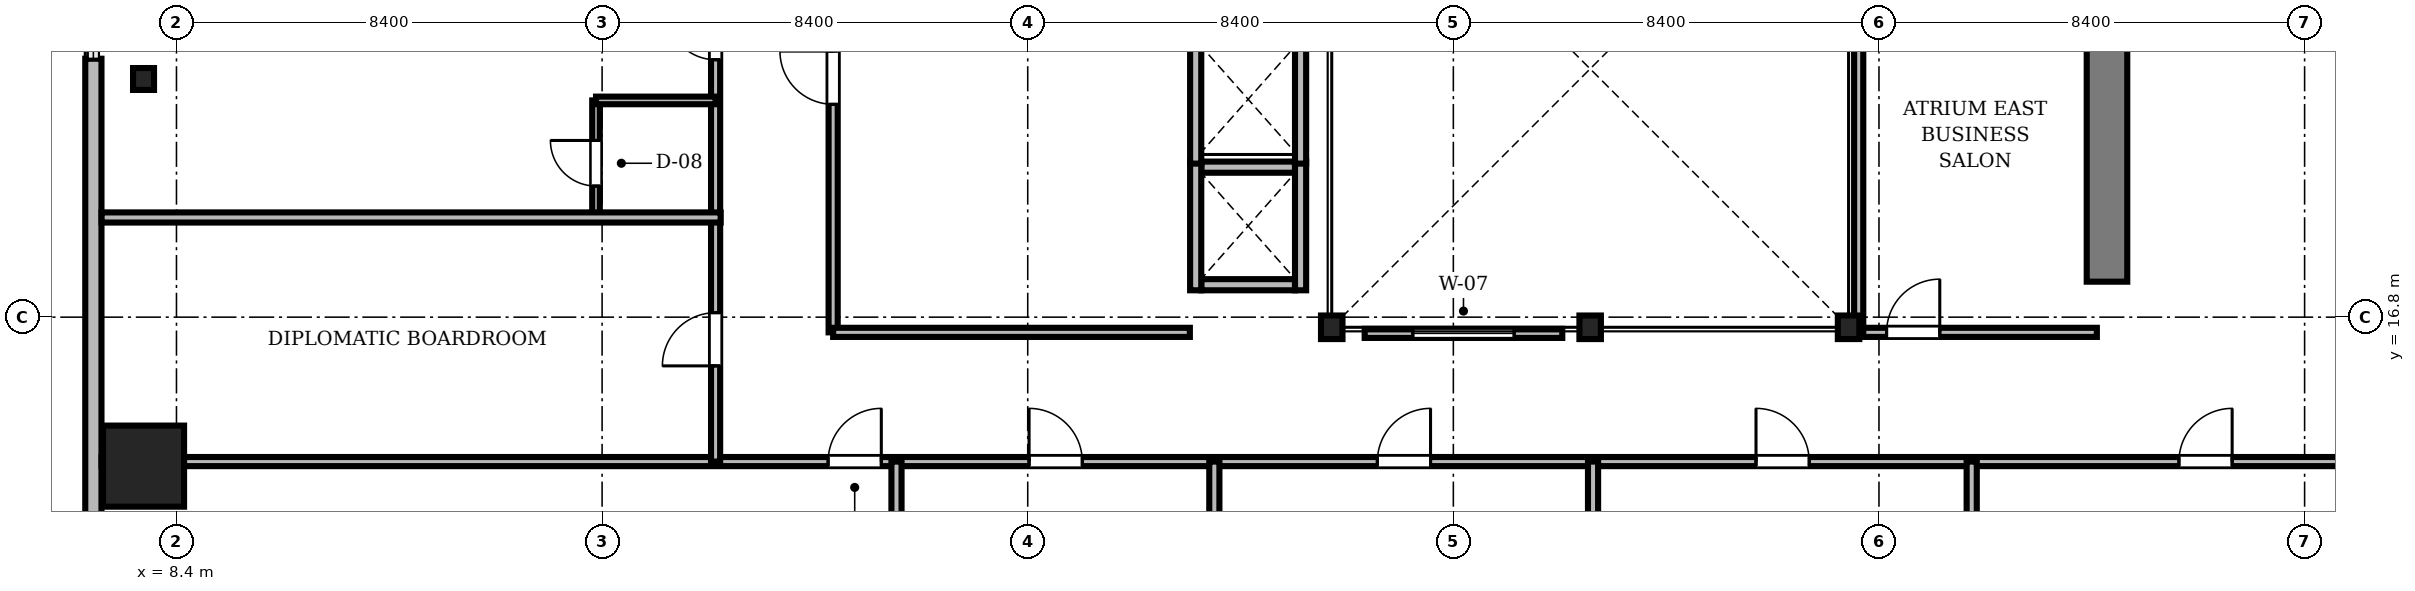
"""IFC4 building model, lengths in metres.
Left out: names, types, materials, properties, quantities, classifications, styles, units other than length and angle.
Written with IfcOpenShell. Run it as: python <this file> out.ifc"""

import sys

from ifc_helpers import new_model, si_unit, direction, frame, frame_2d, origin, origin_2d, place, context, subcontext, project, spatial, rectangle, i_section, extrude, source, transform, mapped, element, fill, save


model = new_model("IFC4")
c1 = context("Model", 3, precision=1e-05, world=origin(), true_north=direction((0.0, 1.0)))
c2 = subcontext(c1, "Body", "Model", "MODEL_VIEW")
j1 = project(units=[si_unit("LENGTHUNIT", "METRE"), si_unit("PLANEANGLEUNIT", "RADIAN")], contexts=[c1])
p1 = place(None, origin())
s1 = spatial("IfcSite", under=j1, at=p1, CompositionType="ELEMENT")
p2 = place(p1, origin())
s2 = spatial("IfcBuilding", under=s1, at=p2, CompositionType="ELEMENT")
p3 = place(p2, frame((0.0, 0.0, 118.7)))
s3 = spatial("IfcBuildingStorey", under=s2, at=p3, CompositionType="ELEMENT", Elevation=118.7)
m1 = source(origin(), c2, "Body", "SweptSolid", [
    extrude(rectangle(XDim=13.15, YDim=0.8, at=frame_2d((6.575, 0.0))), origin(), (0.0, 0.0, 1.0), 3.46),
])
p4 = place(p3, frame((46.5, 17.5, 0.0), z_axis=(0.0, 0.0, 1.0), x_axis=(0.0, 1.0, 0.0)))
e1 = element("IfcWall", 1, at=p4, inside=s3, PredefinedType="SHEAR", context=c2, shape_type="MappedRepresentation", body=[
    mapped(m1, transform((0.0, 0.0, 0.0), scale=1.0)),
])
m2 = source(origin(), c2, "Body", "SweptSolid", [
    extrude(i_section(OverallWidth=0.424, OverallDepth=0.465, WebThickness=0.035, FlangeThickness=0.056, FilletRadius=0.015, at=origin_2d()), origin(), (0.0, 0.0, 1.0), 3.46),
])
for number, where, z_axis, x_axis in (
    (2, (31.2, 16.6, 0.0), (0.0, 0.0, 1.0), (1.0, 0.0, 0.0)),
    (3, (36.3, 16.6, 0.0), (0.0, 0.0, 1.0), (1.0, 0.0, 0.0)),
    (4, (41.4, 16.6, 0.0), (0.0, 0.0, 1.0), (1.0, 0.0, 0.0)),
):
    element("IfcColumn", number, at=place(p3, frame(where, z_axis=z_axis, x_axis=x_axis)), inside=s3, PredefinedType="COLUMN", context=c2, shape_type="MappedRepresentation", body=[
        mapped(m2, transform((0.0, 0.0, 0.0), scale=1.0)),
    ])
m3 = source(origin(), c2, "Body", "SweptSolid", [
    extrude(rectangle(XDim=1.6, YDim=1.6, at=origin_2d()), origin(), (0.0, 0.0, 1.0), 3.46),
])
p5 = place(p3, frame((7.75, 13.86, 0.0), z_axis=(0.0, 0.0, 1.0), x_axis=(1.0, 0.0, 0.0)))
e5 = element("IfcColumn", 5, at=p5, inside=s3, PredefinedType="COLUMN", context=c2, shape_type="MappedRepresentation", body=[
    mapped(m3, transform((0.0, 0.0, 0.0), scale=1.0)),
])
m4 = source(origin(), c2, "Body", "SweptSolid", [
    extrude(i_section(OverallWidth=0.414, OverallDepth=0.432, WebThickness=0.026, FlangeThickness=0.04, FilletRadius=0.015, at=origin_2d()), origin(), (0.0, 0.0, 1.0), 3.46),
])
p6 = place(p3, frame((7.75, 21.5, 0.0), z_axis=(0.0, 0.0, 1.0), x_axis=(1.0, 0.0, 0.0)))
e6 = element("IfcColumn", 6, at=p6, inside=s3, PredefinedType="COLUMN", context=c2, shape_type="MappedRepresentation", body=[
    mapped(m4, transform((0.0, 0.0, 0.0), scale=1.0)),
])
m5 = source(origin(), c2, "Body", "SweptSolid", [
    extrude(rectangle(XDim=15.6, YDim=0.32, at=frame_2d((7.8, 0.0))), origin(), (0.0, 0.0, 1.0), 3.46),
])
p7 = place(p3, frame((6.76, 21.9, 0.0), z_axis=(0.0, 0.0, 1.0), x_axis=(0.0, -1.0, 0.0)))
e7 = element("IfcWall", 7, at=p7, inside=s3, PredefinedType="SOLIDWALL", context=c2, shape_type="MappedRepresentation", body=[
    mapped(m5, transform((0.0, 0.0, 0.0), scale=1.0)),
])
m6 = source(origin(), c2, "Body", "SweptSolid", [
    extrude(rectangle(XDim=2.8, YDim=2.4, at=frame_2d((1.4, 1.2))), frame((0.0, 0.17, 0.0), z_axis=(0.0, -1.0, 0.0), x_axis=(1.0, 0.0, 0.0)), (0.0, 0.0, 1.0), 0.34),
])
p8 = place(p7, frame((10.095, 0.0, 0.72)))
e8 = element("IfcOpeningElement", 8, at=p8, cuts=e7, PredefinedType="OPENING", context=c2, shape_type="MappedRepresentation", body=[
    mapped(m6, transform((0.0, 0.0, 0.0), scale=1.0)),
])
m7 = source(origin(), c2, "Body", "SweptSolid", [
    extrude(rectangle(XDim=1.85, YDim=0.22, at=frame_2d((0.925, 0.0))), origin(), (0.0, 0.0, 1.0), 3.46),
])
for number, where, z_axis, x_axis in (
    (9, (28.625, 17.44, 0.0), (0.0, 0.0, 1.0), (1.0, 0.0, 0.0)),
    (10, (28.625, 19.76, 0.0), (0.0, 0.0, 1.0), (1.0, 0.0, 0.0)),
):
    element("IfcWall", number, at=place(p3, frame(where, z_axis=z_axis, x_axis=x_axis)), inside=s3, PredefinedType="SOLIDWALL", context=c2, shape_type="MappedRepresentation", body=[
        mapped(m7, transform((0.0, 0.0, 0.0), scale=1.0)),
    ])
m8 = source(origin(), c2, "Body", "SweptSolid", [
    extrude(rectangle(XDim=2.54, YDim=0.22, at=frame_2d((1.27, 0.0))), origin(), (0.0, 0.0, 1.0), 3.46),
])
for number, where, z_axis, x_axis in (
    (11, (28.515, 17.33, 0.0), (0.0, 0.0, 1.0), (0.0, 1.0, 0.0)),
    (12, (30.585, 17.33, 0.0), (0.0, 0.0, 1.0), (0.0, 1.0, 0.0)),
    (13, (28.515, 19.83, 0.0), (0.0, 0.0, 1.0), (0.0, 1.0, 0.0)),
    (14, (30.585, 19.83, 0.0), (0.0, 0.0, 1.0), (0.0, 1.0, 0.0)),
):
    element("IfcWall", number, at=place(p3, frame(where, z_axis=z_axis, x_axis=x_axis)), inside=s3, PredefinedType="SOLIDWALL", context=c2, shape_type="MappedRepresentation", body=[
        mapped(m8, transform((0.0, 0.0, 0.0), scale=1.0)),
    ])
m9 = source(origin(), c2, "Body", "SweptSolid", [
    extrude(rectangle(XDim=46.156, YDim=0.18, at=frame_2d((23.078, 0.0))), origin(), (0.0, 0.0, 1.0), 2.702),
])
p9 = place(p3, frame((6.922, 13.95, 0.0), z_axis=(0.0, 0.0, 1.0), x_axis=(1.0, 0.0, 0.0)))
e15 = element("IfcWall", 15, at=p9, inside=s3, PredefinedType="PARTITIONING", context=c2, shape_type="MappedRepresentation", body=[
    mapped(m9, transform((0.0, 0.0, 0.0), scale=1.0)),
])
m10 = source(origin(), c2, "Body", "SweptSolid", [
    extrude(rectangle(XDim=1.05, YDim=2.2, at=frame_2d((0.525, 1.1))), frame((0.0, 0.1, 0.0), z_axis=(0.0, -1.0, 0.0), x_axis=(1.0, 0.0, 0.0)), (0.0, 0.0, 1.0), 0.2),
])
p10 = place(p9, frame((14.338, 0.0, 0.0)))
e16 = element("IfcOpeningElement", 16, at=p10, cuts=e15, PredefinedType="OPENING", context=c2, shape_type="MappedRepresentation", body=[
    mapped(m10, transform((0.0, 0.0, 0.0), scale=1.0)),
])
p11 = place(p9, frame((18.305, 0.0, 0.0)))
e17 = element("IfcOpeningElement", 17, at=p11, cuts=e15, PredefinedType="OPENING", context=c2, shape_type="MappedRepresentation", body=[
    mapped(m10, transform((0.0, 0.0, 0.0), scale=1.0)),
])
p12 = place(p9, frame((25.178, 0.0, 0.0)))
e18 = element("IfcOpeningElement", 18, at=p12, cuts=e15, PredefinedType="OPENING", context=c2, shape_type="MappedRepresentation", body=[
    mapped(m10, transform((0.0, 0.0, 0.0), scale=1.0)),
])
p13 = place(p9, frame((32.651, 0.0, 0.0)))
e19 = element("IfcOpeningElement", 19, at=p13, cuts=e15, PredefinedType="OPENING", context=c2, shape_type="MappedRepresentation", body=[
    mapped(m10, transform((0.0, 0.0, 0.0), scale=1.0)),
])
p14 = place(p9, frame((40.998, 0.0, 0.0)))
e20 = element("IfcOpeningElement", 20, at=p14, cuts=e15, PredefinedType="OPENING", context=c2, shape_type="MappedRepresentation", body=[
    mapped(m10, transform((0.0, 0.0, 0.0), scale=1.0)),
])
m11 = source(origin(), c2, "Body", "SweptSolid", [
    extrude(rectangle(XDim=14.6, YDim=0.18, at=frame_2d((7.3, 0.0))), origin(), (0.0, 0.0, 1.0), 2.852),
])
p15 = place(p3, frame((19.04, 13.95, 0.0), z_axis=(0.0, 0.0, 1.0), x_axis=(0.0, 1.0, 0.0)))
e21 = element("IfcWall", 21, at=p15, inside=s3, PredefinedType="PARTITIONING", context=c2, shape_type="MappedRepresentation", body=[
    mapped(m11, transform((0.0, 0.0, 0.0), scale=1.0)),
])
p16 = place(p15, frame((1.888, 0.0, 0.0)))
e22 = element("IfcOpeningElement", 22, at=p16, cuts=e21, PredefinedType="OPENING", context=c2, shape_type="MappedRepresentation", body=[
    mapped(m10, transform((0.0, 0.0, 0.0), scale=1.0)),
])
m12 = source(origin(), c2, "Body", "SweptSolid", [
    extrude(rectangle(XDim=0.95, YDim=2.15, at=frame_2d((0.475, 1.075))), frame((0.0, 0.1, 0.0), z_axis=(0.0, -1.0, 0.0), x_axis=(1.0, 0.0, 0.0)), (0.0, 0.0, 1.0), 0.2),
])
p17 = place(p15, frame((7.93, 0.0, 0.0)))
e23 = element("IfcOpeningElement", 23, at=p17, cuts=e21, PredefinedType="OPENING", context=c2, shape_type="MappedRepresentation", body=[
    mapped(m12, transform((0.0, 0.0, 0.0), scale=1.0)),
])
p18 = place(p15, frame((11.522, 0.0, 0.0)))
e24 = element("IfcOpeningElement", 24, at=p18, cuts=e21, PredefinedType="OPENING", context=c2, shape_type="MappedRepresentation", body=[
    mapped(m10, transform((0.0, 0.0, 0.0), scale=1.0)),
])
m13 = source(origin(), c2, "Body", "SweptSolid", [
    extrude(rectangle(XDim=11.94, YDim=0.18, at=frame_2d((5.97, 0.0))), origin(), (0.0, 0.0, 1.0), 2.852),
])
p19 = place(p3, frame((21.36, 16.5, 0.0), z_axis=(0.0, 0.0, 1.0), x_axis=(0.0, 1.0, 0.0)))
e25 = element("IfcWall", 25, at=p19, inside=s3, PredefinedType="PARTITIONING", context=c2, shape_type="MappedRepresentation", body=[
    mapped(m13, transform((0.0, 0.0, 0.0), scale=1.0)),
])
p20 = place(p19, frame((4.5, 0.0, 0.0)))
e26 = element("IfcOpeningElement", 26, at=p20, cuts=e25, PredefinedType="OPENING", context=c2, shape_type="MappedRepresentation", body=[
    mapped(m10, transform((0.0, 0.0, 0.0), scale=1.0)),
])
m14 = source(origin(), c2, "Body", "SweptSolid", [
    extrude(rectangle(XDim=4.7, YDim=0.18, at=frame_2d((2.35, 0.0))), origin(), (0.0, 0.0, 1.0), 2.852),
])
p21 = place(p3, frame((41.6, 16.5, 0.0), z_axis=(0.0, 0.0, 1.0), x_axis=(1.0, 0.0, 0.0)))
e27 = element("IfcWall", 27, at=p21, inside=s3, PredefinedType="PARTITIONING", context=c2, shape_type="MappedRepresentation", body=[
    mapped(m14, transform((0.0, 0.0, 0.0), scale=1.0)),
])
p22 = place(p21, frame((0.55, 0.0, 0.0)))
e28 = element("IfcOpeningElement", 28, at=p22, cuts=e27, PredefinedType="OPENING", context=c2, shape_type="MappedRepresentation", body=[
    mapped(m10, transform((0.0, 0.0, 0.0), scale=1.0)),
])
m15 = source(origin(), c2, "Body", "SweptSolid", [
    extrude(rectangle(XDim=2.29, YDim=0.15, at=frame_2d((1.145, 0.0))), origin(), (0.0, 0.0, 1.0), 2.852),
])
p23 = place(p3, frame((16.68, 18.787, 0.0), z_axis=(0.0, 0.0, 1.0), x_axis=(0.0, 1.0, 0.0)))
e29 = element("IfcWall", 29, at=p23, inside=s3, PredefinedType="PARTITIONING", context=c2, shape_type="MappedRepresentation", body=[
    mapped(m15, transform((0.0, 0.0, 0.0), scale=1.0)),
])
m16 = source(origin(), c2, "Body", "SweptSolid", [
    extrude(rectangle(XDim=0.9, YDim=2.1, at=frame_2d((0.45, 1.05))), frame((0.0, 0.085, 0.0), z_axis=(0.0, -1.0, 0.0), x_axis=(1.0, 0.0, 0.0)), (0.0, 0.0, 1.0), 0.17),
])
p24 = place(p23, frame((0.6, 0.0, 0.0)))
e30 = element("IfcOpeningElement", 30, at=p24, cuts=e29, PredefinedType="OPENING", context=c2, shape_type="MappedRepresentation", body=[
    mapped(m16, transform((0.0, 0.0, 0.0), scale=1.0)),
])
m17 = source(origin(), c2, "Body", "SweptSolid", [
    extrude(rectangle(XDim=12.218, YDim=0.2, at=frame_2d((6.109, 0.0))), origin(), (0.0, 0.0, 1.0), 2.702),
])
p25 = place(p3, frame((6.922, 18.767, 0.0), z_axis=(0.0, 0.0, 1.0), x_axis=(1.0, 0.0, 0.0)))
e31 = element("IfcWall", 31, at=p25, inside=s3, PredefinedType="PARTITIONING", context=c2, shape_type="MappedRepresentation", body=[
    mapped(m17, transform((0.0, 0.0, 0.0), scale=1.0)),
])
m18 = source(origin(), c2, "Body", "SweptSolid", [
    extrude(rectangle(XDim=11.828, YDim=0.2, at=frame_2d((5.914, 0.0))), origin(), (0.0, 0.0, 1.0), 2.702),
])
p26 = place(p3, frame((22.61, 2.122, 0.0), z_axis=(0.0, 0.0, 1.0), x_axis=(0.0, 1.0, 0.0)))
e32 = element("IfcWall", 32, at=p26, inside=s3, PredefinedType="PARTITIONING", context=c2, shape_type="MappedRepresentation", body=[
    mapped(m18, transform((0.0, 0.0, 0.0), scale=1.0)),
])
m19 = source(origin(), c2, "Body", "SweptSolid", [
    extrude(rectangle(XDim=12.02, YDim=0.2, at=frame_2d((6.01, 0.0))), origin(), (0.0, 0.0, 1.0), 2.702),
])
p27 = place(p3, frame((28.883, 1.93, 0.0), z_axis=(0.0, 0.0, 1.0), x_axis=(0.0, 1.0, 0.0)))
e33 = element("IfcWall", 33, at=p27, inside=s3, PredefinedType="PARTITIONING", context=c2, shape_type="MappedRepresentation", body=[
    mapped(m19, transform((0.0, 0.0, 0.0), scale=1.0)),
])
for number, where, z_axis, x_axis in (
    (34, (36.357, 2.122, 0.0), (0.0, 0.0, 1.0), (0.0, 1.0, 0.0)),
    (35, (43.83, 2.122, 0.0), (0.0, 0.0, 1.0), (0.0, 1.0, 0.0)),
):
    element("IfcWall", number, at=place(p3, frame(where, z_axis=z_axis, x_axis=x_axis)), inside=s3, PredefinedType="PARTITIONING", context=c2, shape_type="MappedRepresentation", body=[
        mapped(m18, transform((0.0, 0.0, 0.0), scale=1.0)),
    ])
m20 = source(origin(), c2, "Body", "SweptSolid", [
    extrude(rectangle(XDim=7.15, YDim=0.18, at=frame_2d((3.575, 0.0))), origin(), (0.0, 0.0, 1.0), 2.852),
])
p28 = place(p3, frame((41.6, 16.5, 0.0), z_axis=(0.0, 0.0, 1.0), x_axis=(0.0, 1.0, 0.0)))
e36 = element("IfcWall", 36, at=p28, inside=s3, PredefinedType="PARTITIONING", context=c2, shape_type="MappedRepresentation", body=[
    mapped(m20, transform((0.0, 0.0, 0.0), scale=1.0)),
])
m21 = source(origin(), c2, "Body", "SweptSolid", [
    extrude(rectangle(XDim=7.04, YDim=0.18, at=frame_2d((3.52, 0.0))), origin(), (0.0, 0.0, 1.0), 3.46),
])
p29 = place(p3, frame((21.36, 16.5, 0.0), z_axis=(0.0, 0.0, 1.0), x_axis=(1.0, 0.0, 0.0)))
e37 = element("IfcWall", 37, at=p29, inside=s3, PredefinedType="PARTITIONING", context=c2, shape_type="MappedRepresentation", body=[
    mapped(m21, transform((0.0, 0.0, 0.0), scale=1.0)),
])
m22 = source(origin(), c2, "Body", "SweptSolid", [
    extrude(rectangle(XDim=2.36, YDim=0.15, at=frame_2d((1.18, 0.0))), origin(), (0.0, 0.0, 1.0), 3.46),
])
p30 = place(p3, frame((16.68, 21.077, 0.0), z_axis=(0.0, 0.0, 1.0), x_axis=(1.0, 0.0, 0.0)))
e38 = element("IfcWall", 38, at=p30, inside=s3, PredefinedType="PARTITIONING", context=c2, shape_type="MappedRepresentation", body=[
    mapped(m22, transform((0.0, 0.0, 0.0), scale=1.0)),
])
m23 = source(origin(), c2, "Body", "SweptSolid", [
    extrude(rectangle(XDim=3.9, YDim=0.18, at=frame_2d((1.95, 0.0))), origin(), (0.0, 0.0, 1.0), 3.002),
])
p31 = place(p3, frame((31.85, 16.48, 0.0), z_axis=(0.0, 0.0, 1.0), x_axis=(1.0, 0.0, 0.0)))
e39 = element("IfcWall", 39, at=p31, inside=s3, PredefinedType="PARTITIONING", context=c2, shape_type="MappedRepresentation", body=[
    mapped(m23, transform((0.0, 0.0, 0.0), scale=1.0)),
])
m24 = source(origin(), c2, "Body", "SweptSolid", [
    extrude(rectangle(XDim=2.0, YDim=1.9, at=frame_2d((1.0, 0.95))), frame((0.0, 0.1, 0.0), z_axis=(0.0, -1.0, 0.0), x_axis=(1.0, 0.0, 0.0)), (0.0, 0.0, 1.0), 0.2),
])
p32 = place(p31, frame((0.95, 0.0, 0.55)))
e40 = element("IfcOpeningElement", 40, at=p32, cuts=e39, PredefinedType="OPENING", context=c2, shape_type="MappedRepresentation", body=[
    mapped(m24, transform((0.0, 0.0, 0.0), scale=1.0)),
])
m25 = source(origin(), c2, "Body", "SweptSolid", [
    extrude(rectangle(XDim=1.05, YDim=2.2, at=frame_2d((0.525, 1.1))), frame((0.0, 0.025, 0.0), z_axis=(0.0, -1.0, 0.0), x_axis=(1.0, 0.0, 0.0)), (0.0, 0.0, 1.0), 0.05),
])
p33 = place(p10, origin())
e41 = element("IfcDoor", 41, at=p33, inside=s3, OperationType="SINGLE_SWING_RIGHT", PredefinedType="DOOR", context=c2, shape_type="MappedRepresentation", body=[
    mapped(m25, transform((0.0, 0.0, 0.0), scale=1.0)),
])
fill(e16, e41)
p34 = place(p11, origin())
e42 = element("IfcDoor", 42, at=p34, inside=s3, OperationType="SINGLE_SWING_LEFT", PredefinedType="DOOR", context=c2, shape_type="MappedRepresentation", body=[
    mapped(m25, transform((0.0, 0.0, 0.0), scale=1.0)),
])
fill(e17, e42)
p35 = place(p12, origin())
e43 = element("IfcDoor", 43, at=p35, inside=s3, OperationType="SINGLE_SWING_RIGHT", PredefinedType="DOOR", context=c2, shape_type="MappedRepresentation", body=[
    mapped(m25, transform((0.0, 0.0, 0.0), scale=1.0)),
])
fill(e18, e43)
p36 = place(p13, origin())
e44 = element("IfcDoor", 44, at=p36, inside=s3, OperationType="SINGLE_SWING_LEFT", PredefinedType="DOOR", context=c2, shape_type="MappedRepresentation", body=[
    mapped(m25, transform((0.0, 0.0, 0.0), scale=1.0)),
])
fill(e19, e44)
p37 = place(p14, origin())
e45 = element("IfcDoor", 45, at=p37, inside=s3, OperationType="SINGLE_SWING_RIGHT", PredefinedType="DOOR", context=c2, shape_type="MappedRepresentation", body=[
    mapped(m25, transform((0.0, 0.0, 0.0), scale=1.0)),
])
fill(e20, e45)
p38 = place(p16, origin())
e46 = element("IfcDoor", 46, at=p38, inside=s3, OperationType="SINGLE_SWING_LEFT", PredefinedType="DOOR", context=c2, shape_type="MappedRepresentation", body=[
    mapped(m25, transform((0.0, 0.0, 0.0), scale=1.0)),
])
fill(e22, e46)
m26 = source(origin(), c2, "Body", "SweptSolid", [
    extrude(rectangle(XDim=0.95, YDim=2.15, at=frame_2d((0.475, 1.075))), frame((0.0, 0.025, 0.0), z_axis=(0.0, -1.0, 0.0), x_axis=(1.0, 0.0, 0.0)), (0.0, 0.0, 1.0), 0.05),
])
p39 = place(p17, origin())
e47 = element("IfcDoor", 47, at=p39, inside=s3, OperationType="SINGLE_SWING_RIGHT", PredefinedType="DOOR", context=c2, shape_type="MappedRepresentation", body=[
    mapped(m26, transform((0.0, 0.0, 0.0), scale=1.0)),
])
fill(e23, e47)
p40 = place(p20, origin())
e48 = element("IfcDoor", 48, at=p40, inside=s3, OperationType="SINGLE_SWING_RIGHT", PredefinedType="DOOR", context=c2, shape_type="MappedRepresentation", body=[
    mapped(m25, transform((0.0, 0.0, 0.0), scale=1.0)),
])
fill(e26, e48)
p41 = place(p22, origin())
e49 = element("IfcDoor", 49, at=p41, inside=s3, OperationType="SINGLE_SWING_RIGHT", PredefinedType="DOOR", context=c2, shape_type="MappedRepresentation", body=[
    mapped(m25, transform((0.0, 0.0, 0.0), scale=1.0)),
])
fill(e28, e49)
m27 = source(origin(), c2, "Body", "SweptSolid", [
    extrude(rectangle(XDim=0.9, YDim=2.1, at=frame_2d((0.45, 1.05))), frame((0.0, 0.025, 0.0), z_axis=(0.0, -1.0, 0.0), x_axis=(1.0, 0.0, 0.0)), (0.0, 0.0, 1.0), 0.05),
])
p42 = place(p24, origin())
e50 = element("IfcDoor", 50, at=p42, inside=s3, OperationType="SINGLE_SWING_RIGHT", PredefinedType="DOOR", context=c2, shape_type="MappedRepresentation", body=[
    mapped(m27, transform((0.0, 0.0, 0.0), scale=1.0)),
])
fill(e30, e50)
m28 = source(origin(), c2, "Body", "SweptSolid", [
    extrude(rectangle(XDim=2.0, YDim=1.9, at=frame_2d((1.0, 0.95))), frame((0.0, 0.03, 0.0), z_axis=(0.0, -1.0, 0.0), x_axis=(1.0, 0.0, 0.0)), (0.0, 0.0, 1.0), 0.06),
])
p43 = place(p32, origin())
e51 = element("IfcWindow", 51, at=p43, inside=s3, PartitioningType="SINGLE_PANEL", PredefinedType="WINDOW", context=c2, shape_type="MappedRepresentation", body=[
    mapped(m28, transform((0.0, 0.0, 0.0), scale=1.0)),
])
fill(e40, e51)
save(model, sys.argv[1])
